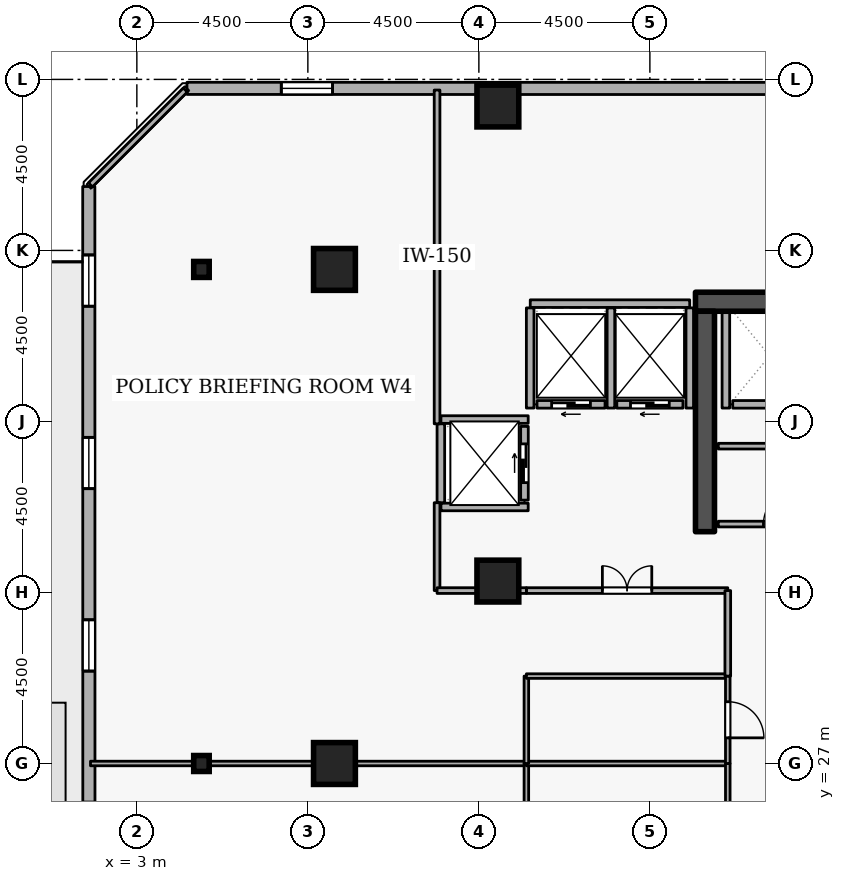
"""IFC4 building model, lengths in metres.
Left out: names, types, materials, properties, quantities, classifications, styles, units other than length and angle.
Written with IfcOpenShell. Run it as: python <this file> out.ifc"""

import sys

from ifc_helpers import new_model, si_unit, direction, frame, frame_2d, origin, origin_2d, place, context, subcontext, project, spatial, rectangle, i_section, extrude, element, fill, save


model = new_model("IFC4")
c1 = context("Model", 3, precision=1e-05, world=origin(), true_north=direction((0.0, 1.0)))
c2 = subcontext(c1, "Body", "Model", "MODEL_VIEW")
j1 = project(units=[si_unit("LENGTHUNIT", "METRE"), si_unit("PLANEANGLEUNIT", "RADIAN")], contexts=[c1])
p1 = place(None, origin())
s1 = spatial("IfcSite", under=j1, at=p1, CompositionType="ELEMENT")
p2 = place(p1, origin())
s2 = spatial("IfcBuilding", under=s1, at=p2, CompositionType="ELEMENT")
p3 = place(p2, frame((0.0, 0.0, 145.5)))
s3 = spatial("IfcBuildingStorey", under=s2, at=p3, CompositionType="ELEMENT", Elevation=145.5)
p4 = place(p3, frame((17.7, 39.15, 0.0), z_axis=(0.0, 0.0, 1.0), x_axis=(1.0, 0.0, 0.0)))
e1 = element("IfcWall", 1, at=p4, inside=s3, PredefinedType="SHEAR", context=c2, shape_type="SweptSolid", body=[
    extrude(rectangle(XDim=15.6, YDim=0.5, at=frame_2d((7.8, 0.0))), origin(), (0.0, 0.0, 1.0), 3.6),
])
p5 = place(p3, frame((17.95, 33.1, 0.0), z_axis=(0.0, 0.0, 1.0), x_axis=(0.0, 1.0, 0.0)))
e2 = element("IfcWall", 2, at=p5, inside=s3, PredefinedType="SHEAR", context=c2, shape_type="SweptSolid", body=[
    extrude(rectangle(XDim=5.8, YDim=0.5, at=frame_2d((2.9, 0.0))), origin(), (0.0, 0.0, 1.0), 3.6),
])
for number, where, z_axis, x_axis in (
    (3, (12.5, 44.3, 0.0), (0.0, 0.0, 1.0), (1.0, 0.0, 0.0)),
    (4, (8.2, 27.0, 0.0), (0.0, 0.0, 1.0), (1.0, 0.0, 0.0)),
    (5, (8.2, 40.0, 0.0), (0.0, 0.0, 1.0), (1.0, 0.0, 0.0)),
    (6, (12.5, 31.8, 0.0), (0.0, 0.0, 1.0), (1.0, 0.0, 0.0)),
):
    element("IfcColumn", number, at=place(p3, frame(where, z_axis=z_axis, x_axis=x_axis)), inside=s3, PredefinedType="COLUMN", context=c2, shape_type="SweptSolid", body=[
        extrude(rectangle(XDim=1.1, YDim=1.1, at=origin_2d()), origin(), (0.0, 0.0, 1.0), 3.6),
    ])
for number, where, z_axis, x_axis in (
    (7, (4.7, 27.0, 0.0), (0.0, 0.0, 1.0), (1.0, 0.0, 0.0)),
    (8, (4.7, 40.0, 0.0), (0.0, 0.0, 1.0), (1.0, 0.0, 0.0)),
):
    element("IfcColumn", number, at=place(p3, frame(where, z_axis=z_axis, x_axis=x_axis)), inside=s3, PredefinedType="COLUMN", context=c2, shape_type="SweptSolid", body=[
        extrude(i_section(OverallWidth=0.407, OverallDepth=0.419, WebThickness=0.031, FlangeThickness=0.049, FilletRadius=0.015, at=origin_2d()), origin(), (0.0, 0.0, 1.0), 3.6),
    ])
p6 = place(p3, frame((38.751, 44.758, 0.0), z_axis=(0.0, 0.0, 1.0), x_axis=(-0.999999983007, 0.000184351399, 0.0)))
e9 = element("IfcWall", 9, at=p6, inside=s3, PredefinedType="STANDARD", context=c2, shape_type="SweptSolid", body=[
    extrude(rectangle(XDim=34.432, YDim=0.32, at=frame_2d((17.216, 0.0))), origin(), (0.0, 0.0, 1.0), 2.22),
])
p7 = place(p6, frame((30.6, 0.0, 0.72)))
e10 = element("IfcOpeningElement", 10, at=p7, cuts=e9, PredefinedType="OPENING", context=c2, shape_type="SweptSolid", body=[
    extrude(rectangle(XDim=1.35, YDim=1.05, at=frame_2d((0.675, 0.525))), frame((0.0, 0.17, 0.0), z_axis=(0.0, -1.0, 0.0), x_axis=(1.0, 0.0, 0.0)), (0.0, 0.0, 1.0), 0.34),
])
p8 = place(p3, frame((1.735, 42.181, 0.0), z_axis=(0.0, 0.0, 1.0), x_axis=(0.000184351399, -0.999999983007, 0.0)))
e11 = element("IfcWall", 11, at=p8, inside=s3, PredefinedType="STANDARD", context=c2, shape_type="SweptSolid", body=[
    extrude(rectangle(XDim=34.432, YDim=0.32, at=frame_2d((17.216, 0.0))), origin(), (0.0, 0.0, 1.0), 2.22),
])
p9 = place(p8, frame((19.016, 0.0, 0.0)))
e12 = element("IfcOpeningElement", 12, at=p9, cuts=e11, PredefinedType="OPENING", context=c2, shape_type="SweptSolid", body=[
    extrude(rectangle(XDim=1.0, YDim=2.08, at=frame_2d((0.5, 1.04))), frame((0.0, 0.17, 0.0), z_axis=(0.0, -1.0, 0.0), x_axis=(1.0, 0.0, 0.0)), (0.0, 0.0, 1.0), 0.34),
])
p10 = place(p8, frame((1.8, 0.0, 0.72)))
e13 = element("IfcOpeningElement", 13, at=p10, cuts=e11, PredefinedType="OPENING", context=c2, shape_type="SweptSolid", body=[
    extrude(rectangle(XDim=1.35, YDim=1.05, at=frame_2d((0.675, 0.525))), frame((0.0, 0.17, 0.0), z_axis=(0.0, -1.0, 0.0), x_axis=(1.0, 0.0, 0.0)), (0.0, 0.0, 1.0), 0.34),
])
p11 = place(p8, frame((6.6, 0.0, 0.72)))
e14 = element("IfcOpeningElement", 14, at=p11, cuts=e11, PredefinedType="OPENING", context=c2, shape_type="SweptSolid", body=[
    extrude(rectangle(XDim=1.35, YDim=1.05, at=frame_2d((0.675, 0.525))), frame((0.0, 0.17, 0.0), z_axis=(0.0, -1.0, 0.0), x_axis=(1.0, 0.0, 0.0)), (0.0, 0.0, 1.0), 0.34),
])
p12 = place(p8, frame((11.4, 0.0, 0.72)))
e15 = element("IfcOpeningElement", 15, at=p12, cuts=e11, PredefinedType="OPENING", context=c2, shape_type="SweptSolid", body=[
    extrude(rectangle(XDim=1.35, YDim=1.05, at=frame_2d((0.675, 0.525))), frame((0.0, 0.17, 0.0), z_axis=(0.0, -1.0, 0.0), x_axis=(1.0, 0.0, 0.0)), (0.0, 0.0, 1.0), 0.34),
])
p13 = place(p8, frame((16.2, 0.0, 0.72)))
e16 = element("IfcOpeningElement", 16, at=p13, cuts=e11, PredefinedType="OPENING", context=c2, shape_type="SweptSolid", body=[
    extrude(rectangle(XDim=1.35, YDim=1.05, at=frame_2d((0.675, 0.525))), frame((0.0, 0.17, 0.0), z_axis=(0.0, -1.0, 0.0), x_axis=(1.0, 0.0, 0.0)), (0.0, 0.0, 1.0), 0.34),
])
p14 = place(p8, frame((21.0, 0.0, 0.72)))
e17 = element("IfcOpeningElement", 17, at=p14, cuts=e11, PredefinedType="OPENING", context=c2, shape_type="SweptSolid", body=[
    extrude(rectangle(XDim=1.35, YDim=1.05, at=frame_2d((0.675, 0.525))), frame((0.0, 0.17, 0.0), z_axis=(0.0, -1.0, 0.0), x_axis=(1.0, 0.0, 0.0)), (0.0, 0.0, 1.0), 0.34),
])
p15 = place(p8, frame((25.8, 0.0, 0.72)))
e18 = element("IfcOpeningElement", 18, at=p15, cuts=e11, PredefinedType="OPENING", context=c2, shape_type="SweptSolid", body=[
    extrude(rectangle(XDim=1.35, YDim=1.05, at=frame_2d((0.675, 0.525))), frame((0.0, 0.17, 0.0), z_axis=(0.0, -1.0, 0.0), x_axis=(1.0, 0.0, 0.0)), (0.0, 0.0, 1.0), 0.34),
])
p16 = place(p8, frame((30.6, 0.0, 0.72)))
e19 = element("IfcOpeningElement", 19, at=p16, cuts=e11, PredefinedType="OPENING", context=c2, shape_type="SweptSolid", body=[
    extrude(rectangle(XDim=1.35, YDim=1.05, at=frame_2d((0.675, 0.525))), frame((0.0, 0.17, 0.0), z_axis=(0.0, -1.0, 0.0), x_axis=(1.0, 0.0, 0.0)), (0.0, 0.0, 1.0), 0.34),
])
p17 = place(p3, frame((20.62, 36.45, 0.0), z_axis=(0.0, 0.0, 1.0), x_axis=(-1.0, 0.0, 0.0)))
e20 = element("IfcWall", 20, at=p17, inside=s3, PredefinedType="STANDARD", context=c2, shape_type="SweptSolid", body=[
    extrude(rectangle(XDim=1.94, YDim=0.2, at=frame_2d((0.97, 0.0))), origin(), (0.0, 0.0, 1.0), 3.3),
])
p18 = place(p3, frame((17.37, 36.45, 0.0), z_axis=(0.0, 0.0, 1.0), x_axis=(-1.0, 0.0, 0.0)))
e21 = element("IfcWall", 21, at=p18, inside=s3, PredefinedType="STANDARD", context=c2, shape_type="SweptSolid", body=[
    extrude(rectangle(XDim=1.74, YDim=0.2, at=frame_2d((0.87, 0.0))), origin(), (0.0, 0.0, 1.0), 3.3),
])
p19 = place(p18, frame((0.36, 0.0, 0.0)))
e22 = element("IfcOpeningElement", 22, at=p19, cuts=e21, PredefinedType="OPENING", context=c2, shape_type="SweptSolid", body=[
    extrude(rectangle(XDim=1.02, YDim=2.06, at=frame_2d((0.51, 1.03))), frame((0.0, 0.11, 0.0), z_axis=(0.0, -1.0, 0.0), x_axis=(1.0, 0.0, 0.0)), (0.0, 0.0, 1.0), 0.22),
])
p20 = place(p3, frame((15.32, 36.45, 0.0), z_axis=(0.0, 0.0, 1.0), x_axis=(-1.0, 0.0, 0.0)))
e23 = element("IfcWall", 23, at=p20, inside=s3, PredefinedType="STANDARD", context=c2, shape_type="SweptSolid", body=[
    extrude(rectangle(XDim=1.79, YDim=0.2, at=frame_2d((0.895, 0.0))), origin(), (0.0, 0.0, 1.0), 3.3),
])
p21 = place(p20, frame((0.385, 0.0, 0.0)))
e24 = element("IfcOpeningElement", 24, at=p21, cuts=e23, PredefinedType="OPENING", context=c2, shape_type="SweptSolid", body=[
    extrude(rectangle(XDim=1.02, YDim=2.06, at=frame_2d((0.51, 1.03))), frame((0.0, 0.11, 0.0), z_axis=(0.0, -1.0, 0.0), x_axis=(1.0, 0.0, 0.0)), (0.0, 0.0, 1.0), 0.22),
])
p22 = place(p3, frame((13.2, 33.93, 0.0), z_axis=(0.0, 0.0, 1.0), x_axis=(0.0, 1.0, 0.0)))
e25 = element("IfcWall", 25, at=p22, inside=s3, PredefinedType="STANDARD", context=c2, shape_type="SweptSolid", body=[
    extrude(rectangle(XDim=1.94, YDim=0.2, at=frame_2d((0.97, 0.0))), origin(), (0.0, 0.0, 1.0), 3.3),
])
p23 = place(p22, frame((0.46, 0.0, 0.0)))
e26 = element("IfcOpeningElement", 26, at=p23, cuts=e25, PredefinedType="OPENING", context=c2, shape_type="SweptSolid", body=[
    extrude(rectangle(XDim=1.02, YDim=2.06, at=frame_2d((0.51, 1.03))), frame((0.0, 0.11, 0.0), z_axis=(0.0, -1.0, 0.0), x_axis=(1.0, 0.0, 0.0)), (0.0, 0.0, 1.0), 0.22),
])
p24 = place(p3, frame((18.5, 36.352, 0.0), z_axis=(0.0, 0.0, 1.0), x_axis=(0.0, 1.0, 0.0)))
e27 = element("IfcWall", 27, at=p24, inside=s3, PredefinedType="STANDARD", context=c2, shape_type="SweptSolid", body=[
    extrude(rectangle(XDim=2.536, YDim=0.2, at=frame_2d((1.268, 0.0))), origin(), (0.0, 0.0, 1.0), 3.3),
])
p25 = place(p3, frame((13.352, 39.1, 0.0), z_axis=(0.0, 0.0, 1.0), x_axis=(1.0, 0.0, 0.0)))
e28 = element("IfcWall", 28, at=p25, inside=s3, PredefinedType="STANDARD", context=c2, shape_type="SweptSolid", body=[
    extrude(rectangle(XDim=4.196, YDim=0.2, at=frame_2d((2.098, 0.0))), origin(), (0.0, 0.0, 1.0), 3.3),
])
p26 = place(p3, frame((17.55, 36.352, 0.0), z_axis=(0.0, 0.0, 1.0), x_axis=(0.0, 1.0, 0.0)))
e29 = element("IfcWall", 29, at=p26, inside=s3, PredefinedType="STANDARD", context=c2, shape_type="SweptSolid", body=[
    extrude(rectangle(XDim=2.636, YDim=0.2, at=frame_2d((1.318, 0.0))), origin(), (0.0, 0.0, 1.0), 2.505),
])
for number, where, z_axis, x_axis in (
    (30, (15.475, 36.352, 0.0), (0.0, 0.0, 1.0), (0.0, 1.0, 0.0)),
    (31, (13.35, 36.352, 0.0), (0.0, 0.0, 1.0), (0.0, 1.0, 0.0)),
):
    element("IfcWall", number, at=place(p3, frame(where, z_axis=z_axis, x_axis=x_axis)), inside=s3, PredefinedType="STANDARD", context=c2, shape_type="SweptSolid", body=[
        extrude(rectangle(XDim=2.636, YDim=0.2, at=frame_2d((1.318, 0.0))), origin(), (0.0, 0.0, 1.0), 3.3),
    ])
for number, where, z_axis, x_axis in (
    (32, (11.002, 36.05, 0.0), (0.0, 0.0, 1.0), (1.0, 0.0, 0.0)),
    (33, (11.002, 33.75, 0.0), (0.0, 0.0, 1.0), (1.0, 0.0, 0.0)),
):
    element("IfcWall", number, at=place(p3, frame(where, z_axis=z_axis, x_axis=x_axis)), inside=s3, PredefinedType="STANDARD", context=c2, shape_type="SweptSolid", body=[
        extrude(rectangle(XDim=2.296, YDim=0.2, at=frame_2d((1.148, 0.0))), origin(), (0.0, 0.0, 1.0), 3.3),
    ])
p27 = place(p3, frame((11.0, 33.862, 0.0), z_axis=(0.0, 0.0, 1.0), x_axis=(0.0, 1.0, 0.0)))
e34 = element("IfcWall", 34, at=p27, inside=s3, PredefinedType="STANDARD", context=c2, shape_type="SweptSolid", body=[
    extrude(rectangle(XDim=2.076, YDim=0.2, at=frame_2d((1.038, 0.0))), origin(), (0.0, 0.0, 1.0), 3.3),
])
p28 = place(p3, frame((18.3, 33.3, 0.0), z_axis=(0.0, 0.0, 1.0), x_axis=(1.0, 0.0, 0.0)))
e35 = element("IfcWall", 35, at=p28, inside=s3, PredefinedType="PARTITIONING", context=c2, shape_type="SweptSolid", body=[
    extrude(rectangle(XDim=3.3, YDim=0.15, at=frame_2d((1.65, 0.0))), origin(), (0.0, 0.0, 1.0), 3.3),
])
p29 = place(p28, frame((1.19, 0.0, 0.0)))
e36 = element("IfcOpeningElement", 36, at=p29, cuts=e35, PredefinedType="OPENING", context=c2, shape_type="SweptSolid", body=[
    extrude(rectangle(XDim=0.92, YDim=2.08, at=frame_2d((0.46, 1.04))), frame((0.0, 0.085, 0.0), z_axis=(0.0, -1.0, 0.0), x_axis=(1.0, 0.0, 0.0)), (0.0, 0.0, 1.0), 0.17),
])
p30 = place(p3, frame((21.6, 35.35, 0.0), z_axis=(0.0, 0.0, 1.0), x_axis=(-1.0, 0.0, 0.0)))
e37 = element("IfcWall", 37, at=p30, inside=s3, PredefinedType="PARTITIONING", context=c2, shape_type="SweptSolid", body=[
    extrude(rectangle(XDim=3.3, YDim=0.15, at=frame_2d((1.65, 0.0))), origin(), (0.0, 0.0, 1.0), 3.3),
])
p31 = place(p3, frame((1.78, 27.0, 0.0), z_axis=(0.0, 0.0, 1.0), x_axis=(1.0, 0.0, 0.0)))
e38 = element("IfcWall", 38, at=p31, inside=s3, PredefinedType="PARTITIONING", context=c2, shape_type="SweptSolid", body=[
    extrude(rectangle(XDim=11.47, YDim=0.12, at=frame_2d((5.735, 0.0))), origin(), (0.0, 0.0, 1.0), 2.842),
])
p32 = place(p3, frame((13.25, 27.0, 0.0), z_axis=(0.0, 0.0, 1.0), x_axis=(0.0, -1.0, 0.0)))
e39 = element("IfcWall", 39, at=p32, inside=s3, PredefinedType="PARTITIONING", context=c2, shape_type="SweptSolid", body=[
    extrude(rectangle(XDim=4.55, YDim=0.12, at=frame_2d((2.275, 0.0))), origin(), (0.0, 0.0, 1.0), 3.3),
])
p33 = place(p3, frame((13.25, 27.0, 0.0), z_axis=(0.0, 0.0, 1.0), x_axis=(1.0, 0.0, 0.0)))
e40 = element("IfcWall", 40, at=p33, inside=s3, PredefinedType="PARTITIONING", context=c2, shape_type="SweptSolid", body=[
    extrude(rectangle(XDim=5.3, YDim=0.12, at=frame_2d((2.65, 0.0))), origin(), (0.0, 0.0, 1.0), 3.3),
])
p34 = place(p3, frame((18.55, 27.0, 0.0), z_axis=(0.0, 0.0, 1.0), x_axis=(0.0, -1.0, 0.0)))
e41 = element("IfcWall", 41, at=p34, inside=s3, PredefinedType="PARTITIONING", context=c2, shape_type="SweptSolid", body=[
    extrude(rectangle(XDim=4.55, YDim=0.12, at=frame_2d((2.275, 0.0))), origin(), (0.0, 0.0, 1.0), 3.3),
])
p35 = place(p3, frame((13.25, 27.0, 0.0), z_axis=(0.0, 0.0, 1.0), x_axis=(0.0, 1.0, 0.0)))
e42 = element("IfcWall", 42, at=p35, inside=s3, PredefinedType="PARTITIONING", context=c2, shape_type="SweptSolid", body=[
    extrude(rectangle(XDim=2.3, YDim=0.12, at=frame_2d((1.15, 0.0))), origin(), (0.0, 0.0, 1.0), 3.3),
])
p36 = place(p3, frame((13.25, 29.3, 0.0), z_axis=(0.0, 0.0, 1.0), x_axis=(1.0, 0.0, 0.0)))
e43 = element("IfcWall", 43, at=p36, inside=s3, PredefinedType="PARTITIONING", context=c2, shape_type="SweptSolid", body=[
    extrude(rectangle(XDim=5.3, YDim=0.12, at=frame_2d((2.65, 0.0))), origin(), (0.0, 0.0, 1.0), 3.3),
])
p37 = place(p3, frame((18.55, 29.3, 0.0), z_axis=(0.0, 0.0, 1.0), x_axis=(0.0, -1.0, 0.0)))
e44 = element("IfcWall", 44, at=p37, inside=s3, PredefinedType="PARTITIONING", context=c2, shape_type="SweptSolid", body=[
    extrude(rectangle(XDim=2.3, YDim=0.12, at=frame_2d((1.15, 0.0))), origin(), (0.0, 0.0, 1.0), 3.3),
])
p38 = place(p37, frame((0.675, 0.0, 0.0)))
e45 = element("IfcOpeningElement", 45, at=p38, cuts=e44, PredefinedType="OPENING", context=c2, shape_type="SweptSolid", body=[
    extrude(rectangle(XDim=0.95, YDim=2.1, at=frame_2d((0.475, 1.05))), frame((0.0, 0.07, 0.0), z_axis=(0.0, -1.0, 0.0), x_axis=(1.0, 0.0, 0.0)), (0.0, 0.0, 1.0), 0.14),
])
p39 = place(p3, frame((13.25, 31.55, 0.0), z_axis=(0.0, 0.0, 1.0), x_axis=(1.0, 0.0, 0.0)))
e46 = element("IfcWall", 46, at=p39, inside=s3, PredefinedType="PARTITIONING", context=c2, shape_type="SweptSolid", body=[
    extrude(rectangle(XDim=5.3, YDim=0.15, at=frame_2d((2.65, 0.0))), origin(), (0.0, 0.0, 1.0), 3.3),
])
p40 = place(p39, frame((2.0, 0.0, 0.0)))
e47 = element("IfcOpeningElement", 47, at=p40, cuts=e46, PredefinedType="OPENING", context=c2, shape_type="SweptSolid", body=[
    extrude(rectangle(XDim=1.3, YDim=2.12, at=frame_2d((0.65, 1.06))), frame((0.0, 0.085, 0.0), z_axis=(0.0, -1.0, 0.0), x_axis=(1.0, 0.0, 0.0)), (0.0, 0.0, 1.0), 0.17),
])
p41 = place(p3, frame((18.55, 31.55, 0.0), z_axis=(0.0, 0.0, 1.0), x_axis=(0.0, -1.0, 0.0)))
e48 = element("IfcWall", 48, at=p41, inside=s3, PredefinedType="PARTITIONING", context=c2, shape_type="SweptSolid", body=[
    extrude(rectangle(XDim=2.25, YDim=0.15, at=frame_2d((1.125, 0.0))), origin(), (0.0, 0.0, 1.0), 3.3),
])
p42 = place(p3, frame((1.78, 42.225, 0.0), z_axis=(0.0, 0.0, 1.0), x_axis=(0.707106781187, 0.707106781187, 0.0)))
e49 = element("IfcWall", 49, at=p42, inside=s3, PredefinedType="PARTITIONING", context=c2, shape_type="SweptSolid", body=[
    extrude(rectangle(XDim=3.528, YDim=0.15, at=frame_2d((1.764, 0.0))), origin(), (0.0, 0.0, 1.0), 3.3),
])
p43 = place(p3, frame((10.9, 44.72, 0.0), z_axis=(0.0, 0.0, 1.0), x_axis=(0.0, -1.0, 0.0)))
e50 = element("IfcWall", 50, at=p43, inside=s3, PredefinedType="PARTITIONING", context=c2, shape_type="SweptSolid", body=[
    extrude(rectangle(XDim=8.782, YDim=0.15, at=frame_2d((4.391, 0.0))), origin(), (0.0, 0.0, 1.0), 3.3),
])
p44 = place(p3, frame((10.9, 33.862, 0.0), z_axis=(0.0, 0.0, 1.0), x_axis=(0.0, -1.0, 0.0)))
e51 = element("IfcWall", 51, at=p44, inside=s3, PredefinedType="PARTITIONING", context=c2, shape_type="SweptSolid", body=[
    extrude(rectangle(XDim=2.312, YDim=0.15, at=frame_2d((1.156, 0.0))), origin(), (0.0, 0.0, 1.0), 3.3),
])
p45 = place(p3, frame((10.9, 31.55, 0.0), z_axis=(0.0, 0.0, 1.0), x_axis=(1.0, 0.0, 0.0)))
e52 = element("IfcWall", 52, at=p45, inside=s3, PredefinedType="PARTITIONING", context=c2, shape_type="SweptSolid", body=[
    extrude(rectangle(XDim=2.35, YDim=0.15, at=frame_2d((1.175, 0.0))), origin(), (0.0, 0.0, 1.0), 3.3),
])
p46 = place(p7, origin())
e53 = element("IfcWindow", 53, at=p46, inside=s3, PartitioningType="SINGLE_PANEL", PredefinedType="WINDOW", context=c2, shape_type="SweptSolid", body=[
    extrude(rectangle(XDim=1.35, YDim=1.05, at=frame_2d((0.675, 0.525))), frame((0.0, 0.03, 0.0), z_axis=(0.0, -1.0, 0.0), x_axis=(1.0, 0.0, 0.0)), (0.0, 0.0, 1.0), 0.06),
])
fill(e10, e53)
p47 = place(p10, origin())
e54 = element("IfcWindow", 54, at=p47, inside=s3, PartitioningType="SINGLE_PANEL", PredefinedType="WINDOW", context=c2, shape_type="SweptSolid", body=[
    extrude(rectangle(XDim=1.35, YDim=1.05, at=frame_2d((0.675, 0.525))), frame((0.0, 0.03, 0.0), z_axis=(0.0, -1.0, 0.0), x_axis=(1.0, 0.0, 0.0)), (0.0, 0.0, 1.0), 0.06),
])
fill(e13, e54)
p48 = place(p11, origin())
e55 = element("IfcWindow", 55, at=p48, inside=s3, PartitioningType="SINGLE_PANEL", PredefinedType="WINDOW", context=c2, shape_type="SweptSolid", body=[
    extrude(rectangle(XDim=1.35, YDim=1.05, at=frame_2d((0.675, 0.525))), frame((0.0, 0.03, 0.0), z_axis=(0.0, -1.0, 0.0), x_axis=(1.0, 0.0, 0.0)), (0.0, 0.0, 1.0), 0.06),
])
fill(e14, e55)
p49 = place(p12, origin())
e56 = element("IfcWindow", 56, at=p49, inside=s3, PartitioningType="SINGLE_PANEL", PredefinedType="WINDOW", context=c2, shape_type="SweptSolid", body=[
    extrude(rectangle(XDim=1.35, YDim=1.05, at=frame_2d((0.675, 0.525))), frame((0.0, 0.03, 0.0), z_axis=(0.0, -1.0, 0.0), x_axis=(1.0, 0.0, 0.0)), (0.0, 0.0, 1.0), 0.06),
])
fill(e15, e56)
p50 = place(p19, origin())
e57 = element("IfcDoor", 57, at=p50, inside=s3, OperationType="SLIDING_TO_LEFT", PredefinedType="DOOR", context=c2, shape_type="SweptSolid", body=[
    extrude(rectangle(XDim=1.02, YDim=2.06, at=frame_2d((0.51, 1.03))), frame((0.0, 0.025, 0.0), z_axis=(0.0, -1.0, 0.0), x_axis=(1.0, 0.0, 0.0)), (0.0, 0.0, 1.0), 0.05),
])
fill(e22, e57)
p51 = place(p21, origin())
e58 = element("IfcDoor", 58, at=p51, inside=s3, OperationType="SLIDING_TO_LEFT", PredefinedType="DOOR", context=c2, shape_type="SweptSolid", body=[
    extrude(rectangle(XDim=1.02, YDim=2.06, at=frame_2d((0.51, 1.03))), frame((0.0, 0.025, 0.0), z_axis=(0.0, -1.0, 0.0), x_axis=(1.0, 0.0, 0.0)), (0.0, 0.0, 1.0), 0.05),
])
fill(e24, e58)
p52 = place(p23, origin())
e59 = element("IfcDoor", 59, at=p52, inside=s3, OperationType="SLIDING_TO_LEFT", PredefinedType="DOOR", context=c2, shape_type="SweptSolid", body=[
    extrude(rectangle(XDim=1.02, YDim=2.06, at=frame_2d((0.51, 1.03))), frame((0.0, 0.025, 0.0), z_axis=(0.0, -1.0, 0.0), x_axis=(1.0, 0.0, 0.0)), (0.0, 0.0, 1.0), 0.05),
])
fill(e26, e59)
p53 = place(p29, origin())
e60 = element("IfcDoor", 60, at=p53, inside=s3, OperationType="SINGLE_SWING_RIGHT", PredefinedType="DOOR", context=c2, shape_type="SweptSolid", body=[
    extrude(rectangle(XDim=0.92, YDim=2.08, at=frame_2d((0.46, 1.04))), frame((0.0, 0.025, 0.0), z_axis=(0.0, -1.0, 0.0), x_axis=(1.0, 0.0, 0.0)), (0.0, 0.0, 1.0), 0.05),
])
fill(e36, e60)
p54 = place(p38, origin())
e61 = element("IfcDoor", 61, at=p54, inside=s3, OperationType="SINGLE_SWING_RIGHT", PredefinedType="DOOR", context=c2, shape_type="SweptSolid", body=[
    extrude(rectangle(XDim=0.95, YDim=2.1, at=frame_2d((0.475, 1.05))), frame((0.0, 0.025, 0.0), z_axis=(0.0, -1.0, 0.0), x_axis=(1.0, 0.0, 0.0)), (0.0, 0.0, 1.0), 0.05),
])
fill(e45, e61)
p55 = place(p40, origin())
e62 = element("IfcDoor", 62, at=p55, inside=s3, OperationType="DOUBLE_DOOR_SINGLE_SWING", PredefinedType="DOOR", context=c2, shape_type="SweptSolid", body=[
    extrude(rectangle(XDim=1.3, YDim=2.12, at=frame_2d((0.65, 1.06))), frame((0.0, 0.025, 0.0), z_axis=(0.0, -1.0, 0.0), x_axis=(1.0, 0.0, 0.0)), (0.0, 0.0, 1.0), 0.05),
])
fill(e47, e62)
save(model, sys.argv[1])
